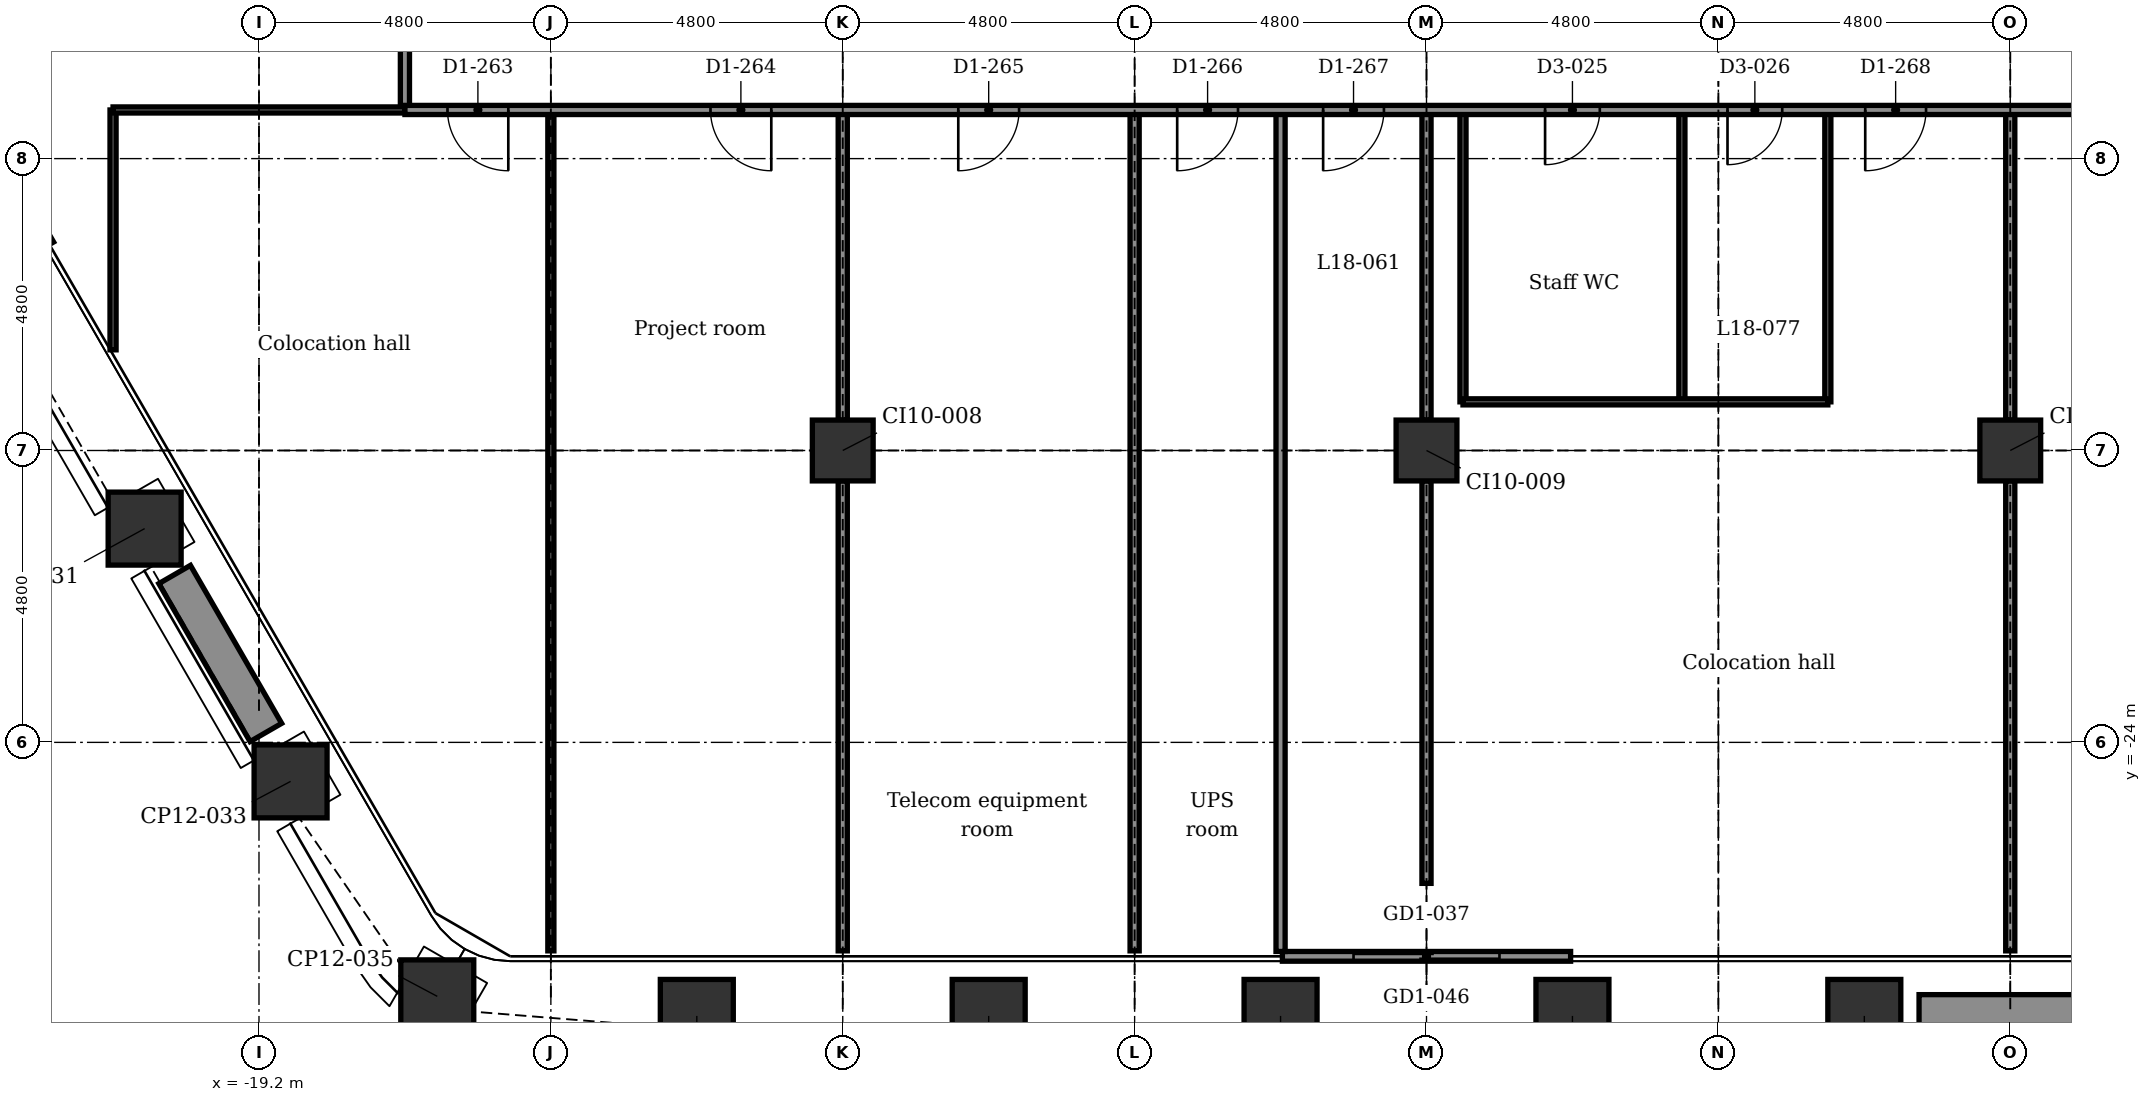
"""IFC4 building model, lengths in metres.
Left out: names, types, materials, properties, quantities, classifications, styles, units other than length and angle.
Written with IfcOpenShell. Run it as: python <this file> out.ifc"""

import sys

from ifc_helpers import new_model, si_unit, direction, frame, frame_2d, origin, origin_2d, place, context, subcontext, project, spatial, rectangle, extrude, element, fill, save


model = new_model("IFC4")
c1 = context("Model", 3, precision=1e-05, world=origin(), true_north=direction((0.0, 1.0)))
c2 = subcontext(c1, "Body", "Model", "MODEL_VIEW")
j1 = project(units=[si_unit("LENGTHUNIT", "METRE"), si_unit("PLANEANGLEUNIT", "RADIAN")], contexts=[c1])
p1 = place(None, origin())
s1 = spatial("IfcSite", under=j1, at=p1, CompositionType="ELEMENT")
p2 = place(p1, origin())
s2 = spatial("IfcBuilding", under=s1, at=p2, CompositionType="ELEMENT")
p3 = place(p2, frame((0.0, 0.0, 95.9)))
s3 = spatial("IfcBuildingStorey", under=s2, at=p3, CompositionType="ELEMENT", Elevation=95.9)
for number, where, z_axis, x_axis in (
    (1, (7.2, -28.499, -0.2), (0.0, 0.0, 1.0), (1.0, 0.0, 0.0)),
    (2, (2.4, -28.499, -0.2), (0.0, 0.0, 1.0), (1.0, 0.0, 0.0)),
    (3, (-2.4, -28.499, -0.2), (0.0, 0.0, 1.0), (1.0, 0.0, 0.0)),
    (4, (-7.2, -28.499, -0.2), (0.0, 0.0, 1.0), (1.0, 0.0, 0.0)),
    (5, (-12.0, -28.499, -0.2), (0.0, 0.0, 1.0), (1.0, 0.0, 0.0)),
    (6, (-16.268, -28.177, -0.2), (0.0, 0.0, 1.0), (0.5, 0.866, 0.0)),
    (7, (-18.68, -24.642, -0.2), (0.0, 0.0, 1.0), (0.866, 0.5, 0.0)),
    (8, (-21.08, -20.485, -0.2), (0.0, 0.0, 1.0), (0.866, 0.5, 0.0)),
):
    element("IfcColumn", number, at=place(p3, frame(where, z_axis=z_axis, x_axis=x_axis)), inside=s3, PredefinedType="COLUMN", context=c2, shape_type="SweptSolid", body=[
        extrude(rectangle(XDim=1.2, YDim=1.2, at=origin_2d()), origin(), (0.0, 0.0, 1.0), 4.5),
    ])
for number, where, z_axis, x_axis in (
    (9, (-9.6, -19.2, -0.2), (0.0, 0.0, 1.0), (1.0, 0.0, 0.0)),
    (10, (0.0, -19.2, -0.2), (0.0, 0.0, 1.0), (1.0, 0.0, 0.0)),
    (11, (9.6, -19.2, -0.2), (0.0, 0.0, 1.0), (1.0, 0.0, 0.0)),
):
    element("IfcColumn", number, at=place(p3, frame(where, z_axis=z_axis, x_axis=x_axis)), inside=s3, PredefinedType="COLUMN", context=c2, shape_type="SweptSolid", body=[
        extrude(rectangle(XDim=1.0, YDim=1.0, at=origin_2d()), origin(), (0.0, 0.0, 1.0), 4.5),
    ])
p4 = place(p3, frame((2.37, -27.519, 0.0), z_axis=(0.0, 0.0, 1.0), x_axis=(-1.0, 0.0, 0.0)))
e12 = element("IfcWall", 12, at=p4, inside=s3, PredefinedType="PARTITIONING", context=c2, shape_type="SweptSolid", body=[
    extrude(rectangle(XDim=4.74, YDim=0.16, at=frame_2d((2.37, 0.0))), origin(), (0.0, 0.0, 1.0), 4.3),
])
p5 = place(p4, frame((1.17, 0.0, 0.0)))
e13 = element("IfcOpeningElement", 13, at=p5, cuts=e12, PredefinedType="OPENING", context=c2, shape_type="SweptSolid", body=[
    extrude(rectangle(XDim=2.4, YDim=2.4, at=frame_2d((1.2, 1.2))), frame((0.0, 0.09, 0.0), z_axis=(0.0, -1.0, 0.0), x_axis=(1.0, 0.0, 0.0)), (0.0, 0.0, 1.0), 0.18),
])
p6 = place(p3, frame((-22.647, -15.812, 0.0), z_axis=(0.0, 0.0, 1.0), x_axis=(-0.499978080042, 0.866038058908, 0.0)))
e14 = element("IfcWall", 14, at=p6, inside=s3, PredefinedType="PARTITIONING", context=c2, shape_type="SweptSolid", body=[
    extrude(rectangle(XDim=4.74, YDim=0.16, at=frame_2d((2.37, 0.0))), origin(), (0.0, 0.0, 1.0), 4.3),
])
p7 = place(p6, frame((1.17, 0.0, 0.0)))
e15 = element("IfcOpeningElement", 15, at=p7, cuts=e14, PredefinedType="OPENING", context=c2, shape_type="SweptSolid", body=[
    extrude(rectangle(XDim=2.4, YDim=2.4, at=frame_2d((1.2, 1.2))), frame((0.0, 0.09, 0.0), z_axis=(0.0, -1.0, 0.0), x_axis=(1.0, 0.0, 0.0)), (0.0, 0.0, 1.0), 0.18),
])
for number, where, z_axis, x_axis in (
    (16, (11.1, -28.448, 0.0), (0.0, 0.0, 1.0), (-1.0, 0.0, 0.0)),
    (17, (-19.087, -23.837, 0.0), (0.0, 0.0, 1.0), (-0.5, 0.866, 0.0)),
):
    element("IfcWall", number, at=place(p3, frame(where, z_axis=z_axis, x_axis=x_axis)), inside=s3, PredefinedType="USERDEFINED", context=c2, shape_type="SweptSolid", body=[
        extrude(rectangle(XDim=3.0, YDim=0.6, at=frame_2d((1.5, 0.0))), origin(), (0.0, 0.0, 1.0), 0.7),
    ])
p8 = place(p3, frame((9.6, -27.428, 0.0), z_axis=(0.0, 0.0, 1.0), x_axis=(0.0, 1.0, 0.0)))
e18 = element("IfcWall", 18, at=p8, inside=s3, PredefinedType="PARTITIONING", context=c2, shape_type="SweptSolid", body=[
    extrude(rectangle(XDim=7.729, YDim=0.15, at=frame_2d((3.864, 0.0))), origin(), (0.0, 0.0, 1.0), 3.843),
])
p9 = place(p3, frame((9.6, -18.7, 0.0), z_axis=(0.0, 0.0, 1.0), x_axis=(0.0, 1.0, 0.0)))
e19 = element("IfcWall", 19, at=p9, inside=s3, PredefinedType="PARTITIONING", context=c2, shape_type="SweptSolid", body=[
    extrude(rectangle(XDim=5.1, YDim=0.15, at=frame_2d((2.55, 0.0))), origin(), (0.0, 0.0, 1.0), 3.843),
])
for number, where, z_axis, x_axis in (
    (20, (6.6, -18.4, 0.0), (0.0, 0.0, 1.0), (0.0, 1.0, 0.0)),
    (21, (4.2, -18.4, 0.0), (0.0, 0.0, 1.0), (0.0, 1.0, 0.0)),
    (22, (0.6, -18.4, 0.0), (0.0, 0.0, 1.0), (0.0, 1.0, 0.0)),
):
    element("IfcWall", number, at=place(p3, frame(where, z_axis=z_axis, x_axis=x_axis)), inside=s3, PredefinedType="PARTITIONING", context=c2, shape_type="SweptSolid", body=[
        extrude(rectangle(XDim=4.8, YDim=0.1, at=frame_2d((2.4, 0.0))), origin(), (0.0, 0.0, 1.0), 4.3),
    ])
p10 = place(p3, frame((0.0, -26.319, 0.0), z_axis=(0.0, 0.0, 1.0), x_axis=(0.0, 1.0, 0.0)))
e23 = element("IfcWall", 23, at=p10, inside=s3, PredefinedType="PARTITIONING", context=c2, shape_type="SweptSolid", body=[
    extrude(rectangle(XDim=6.619, YDim=0.15, at=frame_2d((3.309, 0.0))), origin(), (0.0, 0.0, 1.0), 3.843),
])
p11 = place(p3, frame((0.0, -18.7, 0.0), z_axis=(0.0, 0.0, 1.0), x_axis=(0.0, 1.0, 0.0)))
e24 = element("IfcWall", 24, at=p11, inside=s3, PredefinedType="PARTITIONING", context=c2, shape_type="SweptSolid", body=[
    extrude(rectangle(XDim=5.1, YDim=0.15, at=frame_2d((2.55, 0.0))), origin(), (0.0, 0.0, 1.0), 3.843),
])
p12 = place(p3, frame((-2.4, -27.438, 0.0), z_axis=(0.0, 0.0, 1.0), x_axis=(0.0, 1.0, 0.0)))
e25 = element("IfcWall", 25, at=p12, inside=s3, PredefinedType="PARTITIONING", context=c2, shape_type="SweptSolid", body=[
    extrude(rectangle(XDim=13.838, YDim=0.15, at=frame_2d((6.919, 0.0))), origin(), (0.0, 0.0, 1.0), 4.3),
])
p13 = place(p3, frame((-4.8, -27.428, 0.0), z_axis=(0.0, 0.0, 1.0), x_axis=(0.0, 1.0, 0.0)))
e26 = element("IfcWall", 26, at=p13, inside=s3, PredefinedType="PARTITIONING", context=c2, shape_type="SweptSolid", body=[
    extrude(rectangle(XDim=13.828, YDim=0.15, at=frame_2d((6.914, 0.0))), origin(), (0.0, 0.0, 1.0), 3.843),
])
p14 = place(p3, frame((-9.6, -27.428, 0.0), z_axis=(0.0, 0.0, 1.0), x_axis=(0.0, 1.0, 0.0)))
e27 = element("IfcWall", 27, at=p14, inside=s3, PredefinedType="PARTITIONING", context=c2, shape_type="SweptSolid", body=[
    extrude(rectangle(XDim=7.729, YDim=0.15, at=frame_2d((3.864, 0.0))), origin(), (0.0, 0.0, 1.0), 3.843),
])
p15 = place(p3, frame((-9.6, -18.7, 0.0), z_axis=(0.0, 0.0, 1.0), x_axis=(0.0, 1.0, 0.0)))
e28 = element("IfcWall", 28, at=p15, inside=s3, PredefinedType="PARTITIONING", context=c2, shape_type="SweptSolid", body=[
    extrude(rectangle(XDim=5.1, YDim=0.15, at=frame_2d((2.55, 0.0))), origin(), (0.0, 0.0, 1.0), 3.843),
])
p16 = place(p3, frame((-14.4, -27.428, 0.0), z_axis=(0.0, 0.0, 1.0), x_axis=(0.0, 1.0, 0.0)))
e29 = element("IfcWall", 29, at=p16, inside=s3, PredefinedType="PARTITIONING", context=c2, shape_type="SweptSolid", body=[
    extrude(rectangle(XDim=13.828, YDim=0.1, at=frame_2d((6.914, 0.0))), origin(), (0.0, 0.0, 1.0), 3.843),
])
p17 = place(p3, frame((-16.8, -13.6, 0.0), z_axis=(0.0, 0.0, 1.0), x_axis=(0.0, 1.0, 0.0)))
e30 = element("IfcWall", 30, at=p17, inside=s3, PredefinedType="PARTITIONING", context=c2, shape_type="SweptSolid", body=[
    extrude(rectangle(XDim=9.65, YDim=0.15, at=frame_2d((4.825, 0.0))), origin(), (0.0, 0.0, 1.0), 4.3),
])
p18 = place(p17, frame((1.725, 0.0, 0.0)))
e31 = element("IfcOpeningElement", 31, at=p18, cuts=e30, PredefinedType="OPENING", context=c2, shape_type="SweptSolid", body=[
    extrude(rectangle(XDim=1.0, YDim=2.1, at=frame_2d((0.5, 1.05))), frame((0.0, 0.085, 0.0), z_axis=(0.0, -1.0, 0.0), x_axis=(1.0, 0.0, 0.0)), (0.0, 0.0, 1.0), 0.17),
])
p19 = place(p17, frame((4.555, 0.0, 0.0)))
e32 = element("IfcOpeningElement", 32, at=p19, cuts=e30, PredefinedType="OPENING", context=c2, shape_type="SweptSolid", body=[
    extrude(rectangle(XDim=1.0, YDim=2.1, at=frame_2d((0.5, 1.05))), frame((0.0, 0.085, 0.0), z_axis=(0.0, -1.0, 0.0), x_axis=(1.0, 0.0, 0.0)), (0.0, 0.0, 1.0), 0.17),
])
p20 = place(p17, frame((7.7, 0.0, 0.0)))
e33 = element("IfcOpeningElement", 33, at=p20, cuts=e30, PredefinedType="OPENING", context=c2, shape_type="SweptSolid", body=[
    extrude(rectangle(XDim=1.0, YDim=2.1, at=frame_2d((0.5, 1.05))), frame((0.0, 0.085, 0.0), z_axis=(0.0, -1.0, 0.0), x_axis=(1.0, 0.0, 0.0)), (0.0, 0.0, 1.0), 0.17),
])
p21 = place(p3, frame((-21.6, -17.545, 0.0), z_axis=(0.0, 0.0, 1.0), x_axis=(0.0, 1.0, 0.0)))
e34 = element("IfcWall", 34, at=p21, inside=s3, PredefinedType="PARTITIONING", context=c2, shape_type="SweptSolid", body=[
    extrude(rectangle(XDim=3.945, YDim=0.1, at=frame_2d((1.972, 0.0))), origin(), (0.0, 0.0, 1.0), 4.3),
])
p22 = place(p3, frame((0.6, -18.4, 0.0), z_axis=(0.0, 0.0, 1.0), x_axis=(1.0, 0.0, 0.0)))
e35 = element("IfcWall", 35, at=p22, inside=s3, PredefinedType="PARTITIONING", context=c2, shape_type="SweptSolid", body=[
    extrude(rectangle(XDim=6.0, YDim=0.1, at=frame_2d((3.0, 0.0))), origin(), (0.0, 0.0, 1.0), 4.3),
])
p23 = place(p3, frame((-21.6, -13.6, 0.0), z_axis=(0.0, 0.0, 1.0), x_axis=(1.0, 0.0, 0.0)))
e36 = element("IfcWall", 36, at=p23, inside=s3, PredefinedType="PARTITIONING", context=c2, shape_type="SweptSolid", body=[
    extrude(rectangle(XDim=4.8, YDim=0.1, at=frame_2d((2.4, 0.0))), origin(), (0.0, 0.0, 1.0), 4.3),
])
p24 = place(p3, frame((-16.8, -13.6, 0.0), z_axis=(0.0, 0.0, 1.0), x_axis=(1.0, 0.0, 0.0)))
e37 = element("IfcWall", 37, at=p24, inside=s3, PredefinedType="PARTITIONING", context=c2, shape_type="SweptSolid", body=[
    extrude(rectangle(XDim=38.4, YDim=0.15, at=frame_2d((19.2, 0.0))), origin(), (0.0, 0.0, 1.0), 4.3),
])
p25 = place(p24, frame((0.7, 0.0, 0.0)))
e38 = element("IfcOpeningElement", 38, at=p25, cuts=e37, PredefinedType="OPENING", context=c2, shape_type="SweptSolid", body=[
    extrude(rectangle(XDim=1.0, YDim=2.1, at=frame_2d((0.5, 1.05))), frame((0.0, 0.085, 0.0), z_axis=(0.0, -1.0, 0.0), x_axis=(1.0, 0.0, 0.0)), (0.0, 0.0, 1.0), 0.17),
])
p26 = place(p24, frame((5.025, 0.0, 0.0)))
e39 = element("IfcOpeningElement", 39, at=p26, cuts=e37, PredefinedType="OPENING", context=c2, shape_type="SweptSolid", body=[
    extrude(rectangle(XDim=1.0, YDim=2.1, at=frame_2d((0.5, 1.05))), frame((0.0, 0.085, 0.0), z_axis=(0.0, -1.0, 0.0), x_axis=(1.0, 0.0, 0.0)), (0.0, 0.0, 1.0), 0.17),
])
p27 = place(p24, frame((9.1, 0.0, 0.0)))
e40 = element("IfcOpeningElement", 40, at=p27, cuts=e37, PredefinedType="OPENING", context=c2, shape_type="SweptSolid", body=[
    extrude(rectangle(XDim=1.0, YDim=2.1, at=frame_2d((0.5, 1.05))), frame((0.0, 0.085, 0.0), z_axis=(0.0, -1.0, 0.0), x_axis=(1.0, 0.0, 0.0)), (0.0, 0.0, 1.0), 0.17),
])
p28 = place(p24, frame((12.7, 0.0, 0.0)))
e41 = element("IfcOpeningElement", 41, at=p28, cuts=e37, PredefinedType="OPENING", context=c2, shape_type="SweptSolid", body=[
    extrude(rectangle(XDim=1.0, YDim=2.1, at=frame_2d((0.5, 1.05))), frame((0.0, 0.085, 0.0), z_axis=(0.0, -1.0, 0.0), x_axis=(1.0, 0.0, 0.0)), (0.0, 0.0, 1.0), 0.17),
])
p29 = place(p24, frame((15.1, 0.0, 0.0)))
e42 = element("IfcOpeningElement", 42, at=p29, cuts=e37, PredefinedType="OPENING", context=c2, shape_type="SweptSolid", body=[
    extrude(rectangle(XDim=1.0, YDim=2.1, at=frame_2d((0.5, 1.05))), frame((0.0, 0.085, 0.0), z_axis=(0.0, -1.0, 0.0), x_axis=(1.0, 0.0, 0.0)), (0.0, 0.0, 1.0), 0.17),
])
p30 = place(p24, frame((24.015, 0.0, 0.0)))
e43 = element("IfcOpeningElement", 43, at=p30, cuts=e37, PredefinedType="OPENING", context=c2, shape_type="SweptSolid", body=[
    extrude(rectangle(XDim=1.0, YDim=2.1, at=frame_2d((0.5, 1.05))), frame((0.0, 0.085, 0.0), z_axis=(0.0, -1.0, 0.0), x_axis=(1.0, 0.0, 0.0)), (0.0, 0.0, 1.0), 0.17),
])
p31 = place(p24, frame((29.5, 0.0, 0.0)))
e44 = element("IfcOpeningElement", 44, at=p31, cuts=e37, PredefinedType="OPENING", context=c2, shape_type="SweptSolid", body=[
    extrude(rectangle(XDim=1.0, YDim=2.1, at=frame_2d((0.5, 1.05))), frame((0.0, 0.085, 0.0), z_axis=(0.0, -1.0, 0.0), x_axis=(1.0, 0.0, 0.0)), (0.0, 0.0, 1.0), 0.17),
])
p32 = place(p24, frame((18.75, 0.0, 0.0)))
e45 = element("IfcOpeningElement", 45, at=p32, cuts=e37, PredefinedType="OPENING", context=c2, shape_type="SweptSolid", body=[
    extrude(rectangle(XDim=0.9, YDim=2.1, at=frame_2d((0.45, 1.05))), frame((0.0, 0.085, 0.0), z_axis=(0.0, -1.0, 0.0), x_axis=(1.0, 0.0, 0.0)), (0.0, 0.0, 1.0), 0.17),
])
p33 = place(p24, frame((21.75, 0.0, 0.0)))
e46 = element("IfcOpeningElement", 46, at=p33, cuts=e37, PredefinedType="OPENING", context=c2, shape_type="SweptSolid", body=[
    extrude(rectangle(XDim=0.9, YDim=2.1, at=frame_2d((0.45, 1.05))), frame((0.0, 0.085, 0.0), z_axis=(0.0, -1.0, 0.0), x_axis=(1.0, 0.0, 0.0)), (0.0, 0.0, 1.0), 0.17),
])
p34 = place(p5, origin())
e47 = element("IfcDoor", 47, at=p34, inside=s3, OperationType="DOUBLE_DOOR_SLIDING", PredefinedType="DOOR", context=c2, shape_type="SweptSolid", body=[
    extrude(rectangle(XDim=2.4, YDim=2.4, at=frame_2d((1.2, 1.2))), frame((0.0, 0.025, 0.0), z_axis=(0.0, -1.0, 0.0), x_axis=(1.0, 0.0, 0.0)), (0.0, 0.0, 1.0), 0.05),
])
fill(e13, e47)
p35 = place(p25, frame((1.0, 0.0, 0.0), z_axis=(0.0, 0.0, 1.0), x_axis=(-1.0, 0.0, 0.0)))
e48 = element("IfcDoor", 48, at=p35, inside=s3, OperationType="SINGLE_SWING_RIGHT", PredefinedType="DOOR", context=c2, shape_type="SweptSolid", body=[
    extrude(rectangle(XDim=1.0, YDim=2.1, at=frame_2d((0.5, 1.05))), frame((0.0, 0.025, 0.0), z_axis=(0.0, -1.0, 0.0), x_axis=(1.0, 0.0, 0.0)), (0.0, 0.0, 1.0), 0.05),
])
fill(e38, e48)
p36 = place(p26, frame((1.0, 0.0, 0.0), z_axis=(0.0, 0.0, 1.0), x_axis=(-1.0, 0.0, 0.0)))
e49 = element("IfcDoor", 49, at=p36, inside=s3, OperationType="SINGLE_SWING_RIGHT", PredefinedType="DOOR", context=c2, shape_type="SweptSolid", body=[
    extrude(rectangle(XDim=1.0, YDim=2.1, at=frame_2d((0.5, 1.05))), frame((0.0, 0.025, 0.0), z_axis=(0.0, -1.0, 0.0), x_axis=(1.0, 0.0, 0.0)), (0.0, 0.0, 1.0), 0.05),
])
fill(e39, e49)
p37 = place(p27, frame((1.0, 0.0, 0.0), z_axis=(0.0, 0.0, 1.0), x_axis=(-1.0, 0.0, 0.0)))
e50 = element("IfcDoor", 50, at=p37, inside=s3, OperationType="SINGLE_SWING_LEFT", PredefinedType="DOOR", context=c2, shape_type="SweptSolid", body=[
    extrude(rectangle(XDim=1.0, YDim=2.1, at=frame_2d((0.5, 1.05))), frame((0.0, 0.025, 0.0), z_axis=(0.0, -1.0, 0.0), x_axis=(1.0, 0.0, 0.0)), (0.0, 0.0, 1.0), 0.05),
])
fill(e40, e50)
p38 = place(p28, frame((1.0, 0.0, 0.0), z_axis=(0.0, 0.0, 1.0), x_axis=(-1.0, 0.0, 0.0)))
e51 = element("IfcDoor", 51, at=p38, inside=s3, OperationType="SINGLE_SWING_LEFT", PredefinedType="DOOR", context=c2, shape_type="SweptSolid", body=[
    extrude(rectangle(XDim=1.0, YDim=2.1, at=frame_2d((0.5, 1.05))), frame((0.0, 0.025, 0.0), z_axis=(0.0, -1.0, 0.0), x_axis=(1.0, 0.0, 0.0)), (0.0, 0.0, 1.0), 0.05),
])
fill(e41, e51)
p39 = place(p29, frame((1.0, 0.0, 0.0), z_axis=(0.0, 0.0, 1.0), x_axis=(-1.0, 0.0, 0.0)))
e52 = element("IfcDoor", 52, at=p39, inside=s3, OperationType="SINGLE_SWING_LEFT", PredefinedType="DOOR", context=c2, shape_type="SweptSolid", body=[
    extrude(rectangle(XDim=1.0, YDim=2.1, at=frame_2d((0.5, 1.05))), frame((0.0, 0.025, 0.0), z_axis=(0.0, -1.0, 0.0), x_axis=(1.0, 0.0, 0.0)), (0.0, 0.0, 1.0), 0.05),
])
fill(e42, e52)
p40 = place(p30, frame((1.0, 0.0, 0.0), z_axis=(0.0, 0.0, 1.0), x_axis=(-1.0, 0.0, 0.0)))
e53 = element("IfcDoor", 53, at=p40, inside=s3, OperationType="SINGLE_SWING_LEFT", PredefinedType="DOOR", context=c2, shape_type="SweptSolid", body=[
    extrude(rectangle(XDim=1.0, YDim=2.1, at=frame_2d((0.5, 1.05))), frame((0.0, 0.025, 0.0), z_axis=(0.0, -1.0, 0.0), x_axis=(1.0, 0.0, 0.0)), (0.0, 0.0, 1.0), 0.05),
])
fill(e43, e53)
p41 = place(p32, frame((0.9, 0.0, 0.0), z_axis=(0.0, 0.0, 1.0), x_axis=(-1.0, 0.0, 0.0)))
e54 = element("IfcDoor", 54, at=p41, inside=s3, OperationType="SINGLE_SWING_LEFT", PredefinedType="DOOR", context=c2, shape_type="SweptSolid", body=[
    extrude(rectangle(XDim=0.9, YDim=2.1, at=frame_2d((0.45, 1.05))), frame((0.0, 0.025, 0.0), z_axis=(0.0, -1.0, 0.0), x_axis=(1.0, 0.0, 0.0)), (0.0, 0.0, 1.0), 0.05),
])
fill(e45, e54)
p42 = place(p33, frame((0.9, 0.0, 0.0), z_axis=(0.0, 0.0, 1.0), x_axis=(-1.0, 0.0, 0.0)))
e55 = element("IfcDoor", 55, at=p42, inside=s3, OperationType="SINGLE_SWING_LEFT", PredefinedType="DOOR", context=c2, shape_type="SweptSolid", body=[
    extrude(rectangle(XDim=0.9, YDim=2.1, at=frame_2d((0.45, 1.05))), frame((0.0, 0.025, 0.0), z_axis=(0.0, -1.0, 0.0), x_axis=(1.0, 0.0, 0.0)), (0.0, 0.0, 1.0), 0.05),
])
fill(e46, e55)
save(model, sys.argv[1])
